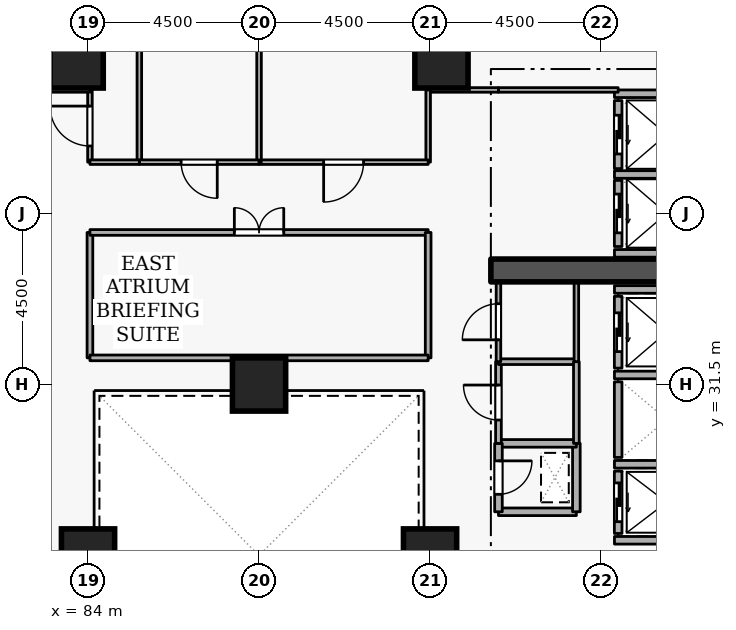
"""IFC4 building model, lengths in metres.
Left out: names, types, materials, properties, quantities, classifications, styles, units other than length and angle.
Written with IfcOpenShell. Run it as: python <this file> out.ifc"""

import sys

from ifc_helpers import new_model, si_unit, direction, frame, frame_2d, origin, origin_2d, place, context, subcontext, project, spatial, rectangle, extrude, element, fill, save


model = new_model("IFC4")
c1 = context("Model", 3, precision=1e-05, world=origin(), true_north=direction((0.0, 1.0)))
c2 = subcontext(c1, "Body", "Model", "MODEL_VIEW")
j1 = project(units=[si_unit("LENGTHUNIT", "METRE"), si_unit("PLANEANGLEUNIT", "RADIAN")], contexts=[c1])
p1 = place(None, origin())
s1 = spatial("IfcSite", under=j1, at=p1, CompositionType="ELEMENT")
p2 = place(p1, origin())
s2 = spatial("IfcBuilding", under=s1, at=p2, CompositionType="ELEMENT")
p3 = place(p2, frame((0.0, 0.0, 38.7)))
s3 = spatial("IfcBuildingStorey", under=s2, at=p3, CompositionType="ELEMENT", Elevation=38.7)
p4 = place(p3, frame((94.6, 34.5, 0.0), z_axis=(0.0, 0.0, 1.0), x_axis=(1.0, 0.0, 0.0)))
e1 = element("IfcWall", 1, at=p4, inside=s3, PredefinedType="SHEAR", context=c2, shape_type="SweptSolid", body=[
    extrude(rectangle(XDim=5.7, YDim=0.6, at=frame_2d((2.85, 0.0))), origin(), (0.0, 0.0, 1.0), 3.6),
])
for number, where, z_axis, x_axis in (
    (2, (93.3, 40.0, 0.0), (0.0, 0.0, 1.0), (1.0, 0.0, 0.0)),
    (3, (83.7, 40.0, 0.0), (0.0, 0.0, 1.0), (1.0, 0.0, 0.0)),
    (4, (93.0, 27.0, 0.0), (0.0, 0.0, 1.0), (1.0, 0.0, 0.0)),
    (5, (84.0, 27.0, 0.0), (0.0, 0.0, 1.0), (1.0, 0.0, 0.0)),
    (6, (88.5, 31.5, 0.0), (0.0, 0.0, 1.0), (1.0, 0.0, 0.0)),
):
    element("IfcColumn", number, at=place(p3, frame(where, z_axis=z_axis, x_axis=x_axis)), inside=s3, PredefinedType="COLUMN", context=c2, shape_type="SweptSolid", body=[
        extrude(rectangle(XDim=1.4, YDim=1.4, at=origin_2d()), origin(), (0.0, 0.0, 1.0), 3.6),
    ])
p5 = place(p3, frame((97.95, 29.22, 0.0), z_axis=(0.0, 0.0, 1.0), x_axis=(0.0, -1.0, 0.0)))
e7 = element("IfcWall", 7, at=p5, inside=s3, PredefinedType="STANDARD", context=c2, shape_type="SweptSolid", body=[
    extrude(rectangle(XDim=1.64, YDim=0.2, at=frame_2d((0.82, 0.0))), origin(), (0.0, 0.0, 1.0), 3.34),
])
p6 = place(p5, frame((0.31, 0.0, 0.0)))
e8 = element("IfcOpeningElement", 8, at=p6, cuts=e7, PredefinedType="OPENING", context=c2, shape_type="SweptSolid", body=[
    extrude(rectangle(XDim=1.02, YDim=2.06, at=frame_2d((0.51, 1.03))), frame((0.0, 0.11, 0.0), z_axis=(0.0, -1.0, 0.0), x_axis=(1.0, 0.0, 0.0)), (0.0, 0.0, 1.0), 0.22),
])
p7 = place(p3, frame((97.95, 31.57, 0.0), z_axis=(0.0, 0.0, 1.0), x_axis=(0.0, -1.0, 0.0)))
e9 = element("IfcWall", 9, at=p7, inside=s3, PredefinedType="STANDARD", context=c2, shape_type="SweptSolid", body=[
    extrude(rectangle(XDim=1.99, YDim=0.2, at=frame_2d((0.995, 0.0))), origin(), (0.0, 0.0, 1.0), 3.34),
])
p8 = place(p3, frame((97.95, 33.82, 0.0), z_axis=(0.0, 0.0, 1.0), x_axis=(0.0, -1.0, 0.0)))
e10 = element("IfcWall", 10, at=p8, inside=s3, PredefinedType="STANDARD", context=c2, shape_type="SweptSolid", body=[
    extrude(rectangle(XDim=1.89, YDim=0.2, at=frame_2d((0.945, 0.0))), origin(), (0.0, 0.0, 1.0), 3.34),
])
p9 = place(p8, frame((0.435, 0.0, 0.0)))
e11 = element("IfcOpeningElement", 11, at=p9, cuts=e10, PredefinedType="OPENING", context=c2, shape_type="SweptSolid", body=[
    extrude(rectangle(XDim=1.02, YDim=2.06, at=frame_2d((0.51, 1.03))), frame((0.0, 0.11, 0.0), z_axis=(0.0, -1.0, 0.0), x_axis=(1.0, 0.0, 0.0)), (0.0, 0.0, 1.0), 0.22),
])
p10 = place(p3, frame((97.95, 36.87, 0.0), z_axis=(0.0, 0.0, 1.0), x_axis=(0.0, -1.0, 0.0)))
e12 = element("IfcWall", 12, at=p10, inside=s3, PredefinedType="STANDARD", context=c2, shape_type="SweptSolid", body=[
    extrude(rectangle(XDim=1.74, YDim=0.2, at=frame_2d((0.87, 0.0))), origin(), (0.0, 0.0, 1.0), 3.34),
])
p11 = place(p10, frame((0.36, 0.0, 0.0)))
e13 = element("IfcOpeningElement", 13, at=p11, cuts=e12, PredefinedType="OPENING", context=c2, shape_type="SweptSolid", body=[
    extrude(rectangle(XDim=1.02, YDim=2.06, at=frame_2d((0.51, 1.03))), frame((0.0, 0.11, 0.0), z_axis=(0.0, -1.0, 0.0), x_axis=(1.0, 0.0, 0.0)), (0.0, 0.0, 1.0), 0.22),
])
p12 = place(p3, frame((97.95, 38.97, 0.0), z_axis=(0.0, 0.0, 1.0), x_axis=(0.0, -1.0, 0.0)))
e14 = element("IfcWall", 14, at=p12, inside=s3, PredefinedType="STANDARD", context=c2, shape_type="SweptSolid", body=[
    extrude(rectangle(XDim=1.79, YDim=0.2, at=frame_2d((0.895, 0.0))), origin(), (0.0, 0.0, 1.0), 3.34),
])
p13 = place(p12, frame((0.385, 0.0, 0.0)))
e15 = element("IfcOpeningElement", 15, at=p13, cuts=e14, PredefinedType="OPENING", context=c2, shape_type="SweptSolid", body=[
    extrude(rectangle(XDim=1.02, YDim=2.06, at=frame_2d((0.51, 1.03))), frame((0.0, 0.11, 0.0), z_axis=(0.0, -1.0, 0.0), x_axis=(1.0, 0.0, 0.0)), (0.0, 0.0, 1.0), 0.22),
])
for number, where, z_axis, x_axis in (
    (16, (97.852, 29.4, 0.0), (0.0, 0.0, 1.0), (1.0, 0.0, 0.0)),
    (17, (97.852, 27.4, 0.0), (0.0, 0.0, 1.0), (1.0, 0.0, 0.0)),
    (18, (97.852, 31.75, 0.0), (0.0, 0.0, 1.0), (1.0, 0.0, 0.0)),
    (19, (97.852, 34.0, 0.0), (0.0, 0.0, 1.0), (1.0, 0.0, 0.0)),
):
    element("IfcWall", number, at=place(p3, frame(where, z_axis=z_axis, x_axis=x_axis)), inside=s3, PredefinedType="STANDARD", context=c2, shape_type="SweptSolid", body=[
        extrude(rectangle(XDim=2.436, YDim=0.2, at=frame_2d((1.218, 0.0))), origin(), (0.0, 0.0, 1.0), 3.34),
    ])
for number, where, z_axis, x_axis in (
    (20, (97.852, 37.025, 0.0), (0.0, 0.0, 1.0), (1.0, 0.0, 0.0)),
    (21, (97.852, 34.95, 0.0), (0.0, 0.0, 1.0), (1.0, 0.0, 0.0)),
):
    element("IfcWall", number, at=place(p3, frame(where, z_axis=z_axis, x_axis=x_axis)), inside=s3, PredefinedType="STANDARD", context=c2, shape_type="SweptSolid", body=[
        extrude(rectangle(XDim=2.746, YDim=0.2, at=frame_2d((1.373, 0.0))), origin(), (0.0, 0.0, 1.0), 3.34),
    ])
p14 = place(p3, frame((97.852, 39.15, 0.0), z_axis=(0.0, 0.0, 1.0), x_axis=(1.0, 0.0, 0.0)))
e22 = element("IfcWall", 22, at=p14, inside=s3, PredefinedType="STANDARD", context=c2, shape_type="SweptSolid", body=[
    extrude(rectangle(XDim=2.636, YDim=0.2, at=frame_2d((1.318, 0.0))), origin(), (0.0, 0.0, 1.0), 3.34),
])
p15 = place(p3, frame((94.8, 28.15, 0.0), z_axis=(0.0, 0.0, 1.0), x_axis=(1.0, 0.0, 0.0)))
e23 = element("IfcWall", 23, at=p15, inside=s3, PredefinedType="STANDARD", context=c2, shape_type="SweptSolid", body=[
    extrude(rectangle(XDim=2.05, YDim=0.2, at=frame_2d((1.025, 0.0))), origin(), (0.0, 0.0, 1.0), 3.34),
])
p16 = place(p3, frame((96.85, 28.15, 0.0), z_axis=(0.0, 0.0, 1.0), x_axis=(0.0, 1.0, 0.0)))
e24 = element("IfcWall", 24, at=p16, inside=s3, PredefinedType="STANDARD", context=c2, shape_type="SweptSolid", body=[
    extrude(rectangle(XDim=1.8, YDim=0.2, at=frame_2d((0.9, 0.0))), origin(), (0.0, 0.0, 1.0), 3.34),
])
p17 = place(p3, frame((96.85, 29.95, 0.0), z_axis=(0.0, 0.0, 1.0), x_axis=(-1.0, 0.0, 0.0)))
e25 = element("IfcWall", 25, at=p17, inside=s3, PredefinedType="STANDARD", context=c2, shape_type="SweptSolid", body=[
    extrude(rectangle(XDim=2.05, YDim=0.2, at=frame_2d((1.025, 0.0))), origin(), (0.0, 0.0, 1.0), 3.34),
])
p18 = place(p3, frame((94.8, 29.95, 0.0), z_axis=(0.0, 0.0, 1.0), x_axis=(0.0, -1.0, 0.0)))
e26 = element("IfcWall", 26, at=p18, inside=s3, PredefinedType="STANDARD", context=c2, shape_type="SweptSolid", body=[
    extrude(rectangle(XDim=1.8, YDim=0.2, at=frame_2d((0.9, 0.0))), origin(), (0.0, 0.0, 1.0), 3.34),
])
p19 = place(p18, frame((0.46, 0.0, 0.0)))
e27 = element("IfcOpeningElement", 27, at=p19, cuts=e26, PredefinedType="OPENING", context=c2, shape_type="SweptSolid", body=[
    extrude(rectangle(XDim=0.88, YDim=2.04, at=frame_2d((0.44, 1.02))), frame((0.0, 0.11, 0.0), z_axis=(0.0, -1.0, 0.0), x_axis=(1.0, 0.0, 0.0)), (0.0, 0.0, 1.0), 0.22),
])
p20 = place(p3, frame((94.8, 29.95, 0.0), z_axis=(0.0, 0.0, 1.0), x_axis=(0.0, 1.0, 0.0)))
e28 = element("IfcWall", 28, at=p20, inside=s3, PredefinedType="PARTITIONING", context=c2, shape_type="SweptSolid", body=[
    extrude(rectangle(XDim=2.15, YDim=0.15, at=frame_2d((1.075, 0.0))), origin(), (0.0, 0.0, 1.0), 3.34),
])
p21 = place(p20, frame((0.615, 0.0, 0.0)))
e29 = element("IfcOpeningElement", 29, at=p21, cuts=e28, PredefinedType="OPENING", context=c2, shape_type="SweptSolid", body=[
    extrude(rectangle(XDim=0.92, YDim=2.08, at=frame_2d((0.46, 1.04))), frame((0.0, 0.085, 0.0), z_axis=(0.0, -1.0, 0.0), x_axis=(1.0, 0.0, 0.0)), (0.0, 0.0, 1.0), 0.17),
])
p22 = place(p3, frame((94.8, 32.1, 0.0), z_axis=(0.0, 0.0, 1.0), x_axis=(1.0, 0.0, 0.0)))
e30 = element("IfcWall", 30, at=p22, inside=s3, PredefinedType="PARTITIONING", context=c2, shape_type="SweptSolid", body=[
    extrude(rectangle(XDim=2.05, YDim=0.15, at=frame_2d((1.025, 0.0))), origin(), (0.0, 0.0, 1.0), 3.34),
])
p23 = place(p3, frame((96.85, 32.1, 0.0), z_axis=(0.0, 0.0, 1.0), x_axis=(0.0, -1.0, 0.0)))
e31 = element("IfcWall", 31, at=p23, inside=s3, PredefinedType="PARTITIONING", context=c2, shape_type="SweptSolid", body=[
    extrude(rectangle(XDim=2.15, YDim=0.15, at=frame_2d((1.075, 0.0))), origin(), (0.0, 0.0, 1.0), 3.34),
])
p24 = place(p3, frame((94.8, 32.1, 0.0), z_axis=(0.0, 0.0, 1.0), x_axis=(0.0, 1.0, 0.0)))
e32 = element("IfcWall", 32, at=p24, inside=s3, PredefinedType="PARTITIONING", context=c2, shape_type="SweptSolid", body=[
    extrude(rectangle(XDim=2.1, YDim=0.12, at=frame_2d((1.05, 0.0))), origin(), (0.0, 0.0, 1.0), 3.34),
])
p25 = place(p24, frame((0.575, 0.0, 0.0)))
e33 = element("IfcOpeningElement", 33, at=p25, cuts=e32, PredefinedType="OPENING", context=c2, shape_type="SweptSolid", body=[
    extrude(rectangle(XDim=0.95, YDim=2.1, at=frame_2d((0.475, 1.05))), frame((0.0, 0.07, 0.0), z_axis=(0.0, -1.0, 0.0), x_axis=(1.0, 0.0, 0.0)), (0.0, 0.0, 1.0), 0.14),
])
p26 = place(p3, frame((96.85, 34.2, 0.0), z_axis=(0.0, 0.0, 1.0), x_axis=(0.0, -1.0, 0.0)))
e34 = element("IfcWall", 34, at=p26, inside=s3, PredefinedType="PARTITIONING", context=c2, shape_type="SweptSolid", body=[
    extrude(rectangle(XDim=2.1, YDim=0.12, at=frame_2d((1.05, 0.0))), origin(), (0.0, 0.0, 1.0), 3.34),
])
p27 = place(p3, frame((97.95, 39.25, 0.0), z_axis=(0.0, 0.0, 1.0), x_axis=(-1.0, 0.0, 0.0)))
e35 = element("IfcWall", 35, at=p27, inside=s3, PredefinedType="PARTITIONING", context=c2, shape_type="SweptSolid", body=[
    extrude(rectangle(XDim=3.15, YDim=0.12, at=frame_2d((1.575, 0.0))), origin(), (0.0, 0.0, 1.0), 3.34),
])
p28 = place(p3, frame((94.8, 39.25, 0.0), z_axis=(0.0, 0.0, 1.0), x_axis=(-1.0, 0.0, 0.0)))
e36 = element("IfcWall", 36, at=p28, inside=s3, PredefinedType="PARTITIONING", context=c2, shape_type="SweptSolid", body=[
    extrude(rectangle(XDim=1.85, YDim=0.12, at=frame_2d((0.925, 0.0))), origin(), (0.0, 0.0, 1.0), 3.34),
])
p29 = place(p3, frame((92.95, 39.25, 0.0), z_axis=(0.0, 0.0, 1.0), x_axis=(0.0, -1.0, 0.0)))
e37 = element("IfcWall", 37, at=p29, inside=s3, PredefinedType="PARTITIONING", context=c2, shape_type="SweptSolid", body=[
    extrude(rectangle(XDim=1.9, YDim=0.12, at=frame_2d((0.95, 0.0))), origin(), (0.0, 0.0, 1.0), 3.34),
])
p30 = place(p3, frame((92.95, 37.35, 0.0), z_axis=(0.0, 0.0, 1.0), x_axis=(-1.0, 0.0, 0.0)))
e38 = element("IfcWall", 38, at=p30, inside=s3, PredefinedType="PARTITIONING", context=c2, shape_type="SweptSolid", body=[
    extrude(rectangle(XDim=4.45, YDim=0.12, at=frame_2d((2.225, 0.0))), origin(), (0.0, 0.0, 1.0), 3.34),
])
p31 = place(p30, frame((1.7, 0.0, 0.0)))
e39 = element("IfcOpeningElement", 39, at=p31, cuts=e38, PredefinedType="OPENING", context=c2, shape_type="SweptSolid", body=[
    extrude(rectangle(XDim=1.05, YDim=2.1, at=frame_2d((0.525, 1.05))), frame((0.0, 0.07, 0.0), z_axis=(0.0, -1.0, 0.0), x_axis=(1.0, 0.0, 0.0)), (0.0, 0.0, 1.0), 0.14),
])
p32 = place(p3, frame((88.5, 37.35, 0.0), z_axis=(0.0, 0.0, 1.0), x_axis=(0.0, 1.0, 0.0)))
e40 = element("IfcWall", 40, at=p32, inside=s3, PredefinedType="PARTITIONING", context=c2, shape_type="SweptSolid", body=[
    extrude(rectangle(XDim=7.87, YDim=0.12, at=frame_2d((3.935, 0.0))), origin(), (0.0, 0.0, 1.0), 2.882),
])
p33 = place(p3, frame((85.35, 37.35, 0.0), z_axis=(0.0, 0.0, 1.0), x_axis=(0.0, 1.0, 0.0)))
e41 = element("IfcWall", 41, at=p33, inside=s3, PredefinedType="PARTITIONING", context=c2, shape_type="SweptSolid", body=[
    extrude(rectangle(XDim=7.87, YDim=0.12, at=frame_2d((3.935, 0.0))), origin(), (0.0, 0.0, 1.0), 3.34),
])
p34 = place(p3, frame((88.5, 37.35, 0.0), z_axis=(0.0, 0.0, 1.0), x_axis=(-1.0, 0.0, 0.0)))
e42 = element("IfcWall", 42, at=p34, inside=s3, PredefinedType="PARTITIONING", context=c2, shape_type="SweptSolid", body=[
    extrude(rectangle(XDim=3.15, YDim=0.12, at=frame_2d((1.575, 0.0))), origin(), (0.0, 0.0, 1.0), 3.34),
])
p35 = place(p34, frame((1.1, 0.0, 0.0)))
e43 = element("IfcOpeningElement", 43, at=p35, cuts=e42, PredefinedType="OPENING", context=c2, shape_type="SweptSolid", body=[
    extrude(rectangle(XDim=0.95, YDim=2.1, at=frame_2d((0.475, 1.05))), frame((0.0, 0.07, 0.0), z_axis=(0.0, -1.0, 0.0), x_axis=(1.0, 0.0, 0.0)), (0.0, 0.0, 1.0), 0.14),
])
p36 = place(p3, frame((84.05, 37.35, 0.0), z_axis=(0.0, 0.0, 1.0), x_axis=(0.0, 1.0, 0.0)))
e44 = element("IfcWall", 44, at=p36, inside=s3, PredefinedType="PARTITIONING", context=c2, shape_type="SweptSolid", body=[
    extrude(rectangle(XDim=1.9, YDim=0.12, at=frame_2d((0.95, 0.0))), origin(), (0.0, 0.0, 1.0), 3.34),
])
p37 = place(p36, frame((0.425, 0.0, 0.0)))
e45 = element("IfcOpeningElement", 45, at=p37, cuts=e44, PredefinedType="OPENING", context=c2, shape_type="SweptSolid", body=[
    extrude(rectangle(XDim=1.05, YDim=2.1, at=frame_2d((0.525, 1.05))), frame((0.0, 0.07, 0.0), z_axis=(0.0, -1.0, 0.0), x_axis=(1.0, 0.0, 0.0)), (0.0, 0.0, 1.0), 0.14),
])
p38 = place(p3, frame((84.05, 39.25, 0.0), z_axis=(0.0, 0.0, 1.0), x_axis=(-1.0, 0.0, 0.0)))
e46 = element("IfcWall", 46, at=p38, inside=s3, PredefinedType="PARTITIONING", context=c2, shape_type="SweptSolid", body=[
    extrude(rectangle(XDim=1.85, YDim=0.12, at=frame_2d((0.925, 0.0))), origin(), (0.0, 0.0, 1.0), 3.34),
])
p39 = place(p3, frame((85.35, 37.35, 0.0), z_axis=(0.0, 0.0, 1.0), x_axis=(-1.0, 0.0, 0.0)))
e47 = element("IfcWall", 47, at=p39, inside=s3, PredefinedType="PARTITIONING", context=c2, shape_type="SweptSolid", body=[
    extrude(rectangle(XDim=1.3, YDim=0.12, at=frame_2d((0.65, 0.0))), origin(), (0.0, 0.0, 1.0), 3.34),
])
p40 = place(p3, frame((84.05, 32.2, 0.0), z_axis=(0.0, 0.0, 1.0), x_axis=(0.0, 1.0, 0.0)))
e48 = element("IfcWall", 48, at=p40, inside=s3, PredefinedType="PARTITIONING", context=c2, shape_type="SweptSolid", body=[
    extrude(rectangle(XDim=3.3, YDim=0.15, at=frame_2d((1.65, 0.0))), origin(), (0.0, 0.0, 1.0), 3.34),
])
p41 = place(p3, frame((84.05, 35.5, 0.0), z_axis=(0.0, 0.0, 1.0), x_axis=(1.0, 0.0, 0.0)))
e49 = element("IfcWall", 49, at=p41, inside=s3, PredefinedType="PARTITIONING", context=c2, shape_type="SweptSolid", body=[
    extrude(rectangle(XDim=8.9, YDim=0.15, at=frame_2d((4.45, 0.0))), origin(), (0.0, 0.0, 1.0), 3.34),
])
p42 = place(p41, frame((3.8, 0.0, 0.0)))
e50 = element("IfcOpeningElement", 50, at=p42, cuts=e49, PredefinedType="OPENING", context=c2, shape_type="SweptSolid", body=[
    extrude(rectangle(XDim=1.3, YDim=2.12, at=frame_2d((0.65, 1.06))), frame((0.0, 0.085, 0.0), z_axis=(0.0, -1.0, 0.0), x_axis=(1.0, 0.0, 0.0)), (0.0, 0.0, 1.0), 0.17),
])
p43 = place(p3, frame((92.95, 35.5, 0.0), z_axis=(0.0, 0.0, 1.0), x_axis=(0.0, -1.0, 0.0)))
e51 = element("IfcWall", 51, at=p43, inside=s3, PredefinedType="PARTITIONING", context=c2, shape_type="SweptSolid", body=[
    extrude(rectangle(XDim=3.3, YDim=0.15, at=frame_2d((1.65, 0.0))), origin(), (0.0, 0.0, 1.0), 3.34),
])
p44 = place(p3, frame((92.95, 32.2, 0.0), z_axis=(0.0, 0.0, 1.0), x_axis=(-1.0, 0.0, 0.0)))
e52 = element("IfcWall", 52, at=p44, inside=s3, PredefinedType="PARTITIONING", context=c2, shape_type="SweptSolid", body=[
    extrude(rectangle(XDim=8.9, YDim=0.15, at=frame_2d((4.45, 0.0))), origin(), (0.0, 0.0, 1.0), 3.34),
])
p45 = place(p6, origin())
e53 = element("IfcDoor", 53, at=p45, inside=s3, OperationType="SLIDING_TO_LEFT", PredefinedType="DOOR", context=c2, shape_type="SweptSolid", body=[
    extrude(rectangle(XDim=1.02, YDim=2.06, at=frame_2d((0.51, 1.03))), frame((0.0, 0.025, 0.0), z_axis=(0.0, -1.0, 0.0), x_axis=(1.0, 0.0, 0.0)), (0.0, 0.0, 1.0), 0.05),
])
fill(e8, e53)
p46 = place(p9, origin())
e54 = element("IfcDoor", 54, at=p46, inside=s3, OperationType="SLIDING_TO_LEFT", PredefinedType="DOOR", context=c2, shape_type="SweptSolid", body=[
    extrude(rectangle(XDim=1.02, YDim=2.06, at=frame_2d((0.51, 1.03))), frame((0.0, 0.025, 0.0), z_axis=(0.0, -1.0, 0.0), x_axis=(1.0, 0.0, 0.0)), (0.0, 0.0, 1.0), 0.05),
])
fill(e11, e54)
p47 = place(p11, origin())
e55 = element("IfcDoor", 55, at=p47, inside=s3, OperationType="SLIDING_TO_LEFT", PredefinedType="DOOR", context=c2, shape_type="SweptSolid", body=[
    extrude(rectangle(XDim=1.02, YDim=2.06, at=frame_2d((0.51, 1.03))), frame((0.0, 0.025, 0.0), z_axis=(0.0, -1.0, 0.0), x_axis=(1.0, 0.0, 0.0)), (0.0, 0.0, 1.0), 0.05),
])
fill(e13, e55)
p48 = place(p13, origin())
e56 = element("IfcDoor", 56, at=p48, inside=s3, OperationType="SLIDING_TO_LEFT", PredefinedType="DOOR", context=c2, shape_type="SweptSolid", body=[
    extrude(rectangle(XDim=1.02, YDim=2.06, at=frame_2d((0.51, 1.03))), frame((0.0, 0.025, 0.0), z_axis=(0.0, -1.0, 0.0), x_axis=(1.0, 0.0, 0.0)), (0.0, 0.0, 1.0), 0.05),
])
fill(e15, e56)
p49 = place(p19, origin())
e57 = element("IfcDoor", 57, at=p49, inside=s3, OperationType="SINGLE_SWING_LEFT", PredefinedType="DOOR", context=c2, shape_type="SweptSolid", body=[
    extrude(rectangle(XDim=0.88, YDim=2.04, at=frame_2d((0.44, 1.02))), frame((0.0, 0.025, 0.0), z_axis=(0.0, -1.0, 0.0), x_axis=(1.0, 0.0, 0.0)), (0.0, 0.0, 1.0), 0.05),
])
fill(e27, e57)
p50 = place(p21, origin())
e58 = element("IfcDoor", 58, at=p50, inside=s3, OperationType="SINGLE_SWING_RIGHT", PredefinedType="DOOR", context=c2, shape_type="SweptSolid", body=[
    extrude(rectangle(XDim=0.92, YDim=2.08, at=frame_2d((0.46, 1.04))), frame((0.0, 0.025, 0.0), z_axis=(0.0, -1.0, 0.0), x_axis=(1.0, 0.0, 0.0)), (0.0, 0.0, 1.0), 0.05),
])
fill(e29, e58)
p51 = place(p25, origin())
e59 = element("IfcDoor", 59, at=p51, inside=s3, OperationType="SINGLE_SWING_LEFT", PredefinedType="DOOR", context=c2, shape_type="SweptSolid", body=[
    extrude(rectangle(XDim=0.95, YDim=2.1, at=frame_2d((0.475, 1.05))), frame((0.0, 0.025, 0.0), z_axis=(0.0, -1.0, 0.0), x_axis=(1.0, 0.0, 0.0)), (0.0, 0.0, 1.0), 0.05),
])
fill(e33, e59)
p52 = place(p31, origin())
e60 = element("IfcDoor", 60, at=p52, inside=s3, OperationType="SINGLE_SWING_RIGHT", PredefinedType="DOOR", context=c2, shape_type="SweptSolid", body=[
    extrude(rectangle(XDim=1.05, YDim=2.1, at=frame_2d((0.525, 1.05))), frame((0.0, 0.025, 0.0), z_axis=(0.0, -1.0, 0.0), x_axis=(1.0, 0.0, 0.0)), (0.0, 0.0, 1.0), 0.05),
])
fill(e39, e60)
p53 = place(p35, origin())
e61 = element("IfcDoor", 61, at=p53, inside=s3, OperationType="SINGLE_SWING_LEFT", PredefinedType="DOOR", context=c2, shape_type="SweptSolid", body=[
    extrude(rectangle(XDim=0.95, YDim=2.1, at=frame_2d((0.475, 1.05))), frame((0.0, 0.025, 0.0), z_axis=(0.0, -1.0, 0.0), x_axis=(1.0, 0.0, 0.0)), (0.0, 0.0, 1.0), 0.05),
])
fill(e43, e61)
p54 = place(p37, origin())
e62 = element("IfcDoor", 62, at=p54, inside=s3, OperationType="SINGLE_SWING_RIGHT", PredefinedType="DOOR", context=c2, shape_type="SweptSolid", body=[
    extrude(rectangle(XDim=1.05, YDim=2.1, at=frame_2d((0.525, 1.05))), frame((0.0, 0.025, 0.0), z_axis=(0.0, -1.0, 0.0), x_axis=(1.0, 0.0, 0.0)), (0.0, 0.0, 1.0), 0.05),
])
fill(e45, e62)
p55 = place(p42, origin())
e63 = element("IfcDoor", 63, at=p55, inside=s3, OperationType="DOUBLE_DOOR_SINGLE_SWING", PredefinedType="DOOR", context=c2, shape_type="SweptSolid", body=[
    extrude(rectangle(XDim=1.3, YDim=2.12, at=frame_2d((0.65, 1.06))), frame((0.0, 0.025, 0.0), z_axis=(0.0, -1.0, 0.0), x_axis=(1.0, 0.0, 0.0)), (0.0, 0.0, 1.0), 0.05),
])
fill(e50, e63)
save(model, sys.argv[1])
